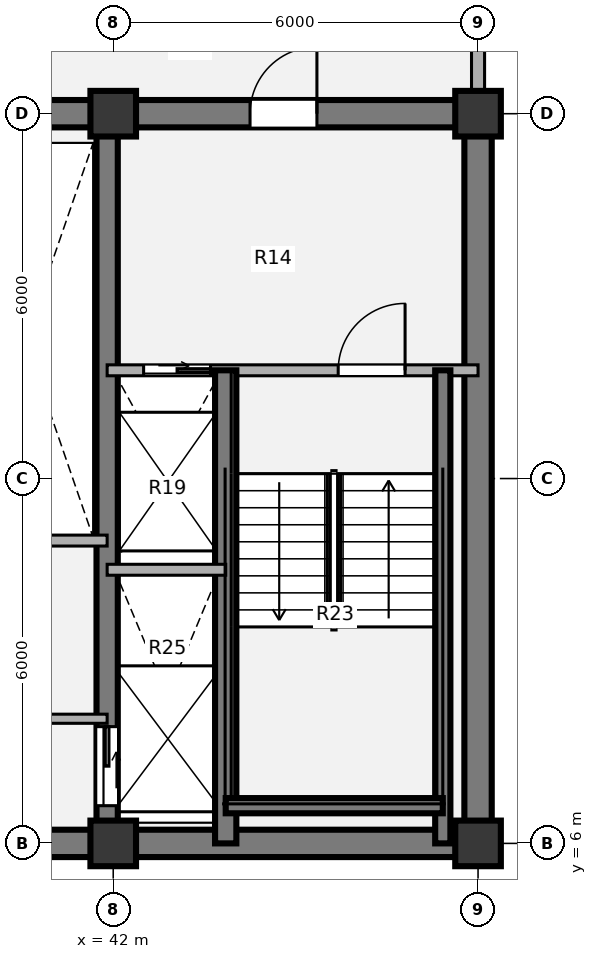
"""IFC4 building model, lengths in metres.
Left out: names, types, materials, properties, quantities, classifications, styles, units other than length and angle.
Written with IfcOpenShell. Run it as: python <this file> out.ifc"""

import sys

from ifc_helpers import new_model, si_unit, direction, frame, frame_2d, origin, origin_2d, place, context, subcontext, project, spatial, rectangle, extrude, source, transform, mapped, element, fill, save


model = new_model("IFC4")
c1 = context("Model", 3, precision=1e-05, world=origin(), true_north=direction((0.0, 1.0)))
c2 = subcontext(c1, "Body", "Model", "MODEL_VIEW")
j1 = project(units=[si_unit("LENGTHUNIT", "METRE"), si_unit("PLANEANGLEUNIT", "RADIAN")], contexts=[c1])
p1 = place(None, origin())
s1 = spatial("IfcSite", under=j1, at=p1, CompositionType="ELEMENT")
p2 = place(p1, origin())
s2 = spatial("IfcBuilding", under=s1, at=p2, CompositionType="ELEMENT")
p3 = place(p2, frame((0.0, 0.0, 186.66)))
s3 = spatial("IfcBuildingStorey", under=s2, at=p3, CompositionType="ELEMENT", Elevation=186.66)
m1 = source(origin(), c2, "Body", "SweptSolid", [
    extrude(rectangle(XDim=0.75, YDim=0.75, at=origin_2d()), origin(), (0.0, 0.0, 1.0), 3.78),
])
for number, where, z_axis, x_axis in (
    (1, (42.0, 6.0, 0.0), (0.0, 0.0, 1.0), (1.0, 0.0, 0.0)),
    (2, (48.0, 6.0, 0.0), (0.0, 0.0, 1.0), (1.0, 0.0, 0.0)),
    (3, (42.0, 18.0, 0.0), (0.0, 0.0, 1.0), (1.0, 0.0, 0.0)),
    (4, (48.0, 18.0, 0.0), (0.0, 0.0, 1.0), (1.0, 0.0, 0.0)),
):
    element("IfcColumn", number, at=place(p3, frame(where, z_axis=z_axis, x_axis=x_axis)), inside=s3, PredefinedType="COLUMN", context=c2, shape_type="MappedRepresentation", body=[
        mapped(m1, transform((0.0, 0.0, 0.0), x_axis=(1.0, 0.0, 0.0), y_axis=(0.0, 1.0, 0.0), z_axis=(0.0, 0.0, 1.0), scale=1.0)),
    ])
p4 = place(p3, frame((48.225, 6.0, 0.0), z_axis=(0.0, 0.0, 1.0), x_axis=(-1.0, 0.0, 0.0)))
e5 = element("IfcWall", 5, at=p4, inside=s3, PredefinedType="SHEAR", context=c2, shape_type="SweptSolid", body=[
    extrude(rectangle(XDim=24.45, YDim=0.45, at=frame_2d((12.225, 0.0))), origin(), (0.0, 0.0, 1.0), 3.78),
])
p5 = place(p3, frame((48.0, 18.0, 0.0), z_axis=(0.0, 0.0, 1.0), x_axis=(0.0, -1.0, 0.0)))
e6 = element("IfcWall", 6, at=p5, inside=s3, PredefinedType="SHEAR", context=c2, shape_type="SweptSolid", body=[
    extrude(rectangle(XDim=12.0, YDim=0.45, at=frame_2d((6.0, 0.0))), origin(), (0.0, 0.0, 1.0), 3.78),
])
p6 = place(p3, frame((38.8, 18.0, 0.0), z_axis=(0.0, 0.0, 1.0), x_axis=(1.0, 0.0, 0.0)))
e7 = element("IfcWall", 7, at=p6, inside=s3, PredefinedType="SHEAR", context=c2, shape_type="SweptSolid", body=[
    extrude(rectangle(XDim=9.425, YDim=0.45, at=frame_2d((4.712, 0.0))), origin(), (0.0, 0.0, 1.0), 3.78),
])
p7 = place(p6, frame((5.45, 0.0, 0.0)))
e8 = element("IfcOpeningElement", 8, at=p7, cuts=e7, PredefinedType="OPENING", context=c2, shape_type="SweptSolid", body=[
    extrude(rectangle(XDim=1.1, YDim=2.1, at=origin_2d()), frame((0.55, 0.235, 1.05), z_axis=(0.0, -1.0, 0.0), x_axis=(1.0, 0.0, 0.0)), (0.0, 0.0, 1.0), 0.47),
])
p8 = place(p3, frame((41.9, 18.0, 0.0), z_axis=(0.0, 0.0, 1.0), x_axis=(0.0, -1.0, 0.0)))
e9 = element("IfcWall", 9, at=p8, inside=s3, PredefinedType="SHEAR", context=c2, shape_type="SweptSolid", body=[
    extrude(rectangle(XDim=12.0, YDim=0.35, at=frame_2d((6.0, 0.0))), origin(), (0.0, 0.0, 1.0), 3.78),
])
p9 = place(p8, frame((10.08, 0.0, 0.0)))
e10 = element("IfcOpeningElement", 10, at=p9, cuts=e9, PredefinedType="OPENING", context=c2, shape_type="SweptSolid", body=[
    extrude(rectangle(XDim=1.3, YDim=2.1, at=origin_2d()), frame((0.65, 0.185, 1.05), z_axis=(0.0, -1.0, 0.0), x_axis=(1.0, 0.0, 0.0)), (0.0, 0.0, 1.0), 0.37),
])
p10 = place(p3, frame((48.0, 21.05, 0.0), z_axis=(0.0, 0.0, 1.0), x_axis=(0.0, -1.0, 0.0)))
e11 = element("IfcWall", 11, at=p10, inside=s3, PredefinedType="SOLIDWALL", context=c2, shape_type="SweptSolid", body=[
    extrude(rectangle(XDim=2.695, YDim=0.215, at=frame_2d((1.348, 0.0))), origin(), (0.0, 0.0, 1.0), 2.718),
])
p11 = place(p3, frame((38.0, 8.05, 0.0), z_axis=(0.0, 0.0, 1.0), x_axis=(1.0, 0.0, 0.0)))
e12 = element("IfcWall", 12, at=p11, inside=s3, PredefinedType="PARTITIONING", context=c2, shape_type="SweptSolid", body=[
    extrude(rectangle(XDim=3.9, YDim=0.15, at=frame_2d((1.95, 0.0))), origin(), (0.0, 0.0, 1.0), 3.5),
])
p12 = place(p11, frame((1.45, 0.0, 0.0)))
e13 = element("IfcOpeningElement", 13, at=p12, cuts=e12, PredefinedType="OPENING", context=c2, shape_type="SweptSolid", body=[
    extrude(rectangle(XDim=0.86, YDim=2.1, at=origin_2d()), frame((0.43, 0.085, 1.05), z_axis=(0.0, -1.0, 0.0), x_axis=(1.0, 0.0, 0.0)), (0.0, 0.0, 1.0), 0.17),
])
p13 = place(p3, frame((38.0, 10.98, 0.0), z_axis=(0.0, 0.0, 1.0), x_axis=(1.0, 0.0, 0.0)))
e14 = element("IfcWall", 14, at=p13, inside=s3, PredefinedType="PARTITIONING", context=c2, shape_type="SweptSolid", body=[
    extrude(rectangle(XDim=3.9, YDim=0.18, at=frame_2d((1.95, 0.0))), origin(), (0.0, 0.0, 1.0), 3.5),
])
p14 = place(p3, frame((41.9, 13.78, 0.0), z_axis=(0.0, 0.0, 1.0), x_axis=(1.0, 0.0, 0.0)))
e15 = element("IfcWall", 15, at=p14, inside=s3, PredefinedType="PARTITIONING", context=c2, shape_type="SweptSolid", body=[
    extrude(rectangle(XDim=6.1, YDim=0.18, at=frame_2d((3.05, 0.0))), origin(), (0.0, 0.0, 1.0), 3.5),
])
p15 = place(p14, frame((0.6, 0.0, 0.0)))
e16 = element("IfcOpeningElement", 16, at=p15, cuts=e15, PredefinedType="OPENING", context=c2, shape_type="SweptSolid", body=[
    extrude(rectangle(XDim=1.1, YDim=2.1, at=origin_2d()), frame((0.55, 0.1, 1.05), z_axis=(0.0, -1.0, 0.0), x_axis=(1.0, 0.0, 0.0)), (0.0, 0.0, 1.0), 0.2),
])
p16 = place(p14, frame((3.8, 0.0, 0.0)))
e17 = element("IfcOpeningElement", 17, at=p16, cuts=e15, PredefinedType="OPENING", context=c2, shape_type="SweptSolid", body=[
    extrude(rectangle(XDim=1.1, YDim=2.1, at=origin_2d()), frame((0.55, 0.1, 1.05), z_axis=(0.0, -1.0, 0.0), x_axis=(1.0, 0.0, 0.0)), (0.0, 0.0, 1.0), 0.2),
])
p17 = place(p3, frame((43.85, 6.0, 0.0), z_axis=(0.0, 0.0, 1.0), x_axis=(0.0, 1.0, 0.0)))
e18 = element("IfcWall", 18, at=p17, inside=s3, PredefinedType="SHEAR", context=c2, shape_type="SweptSolid", body=[
    extrude(rectangle(XDim=7.78, YDim=0.35, at=frame_2d((3.89, 0.0))), origin(), (0.0, 0.0, 1.0), 3.85),
])
p18 = place(p3, frame((47.42, 6.0, 0.0), z_axis=(0.0, 0.0, 1.0), x_axis=(0.0, 1.0, 0.0)))
e19 = element("IfcWall", 19, at=p18, inside=s3, PredefinedType="SHEAR", context=c2, shape_type="SweptSolid", body=[
    extrude(rectangle(XDim=7.78, YDim=0.25, at=frame_2d((3.89, 0.0))), origin(), (0.0, 0.0, 1.0), 3.85),
])
p19 = place(p3, frame((43.85, 6.62, 0.0), z_axis=(0.0, 0.0, 1.0), x_axis=(1.0, 0.0, 0.0)))
e20 = element("IfcWall", 20, at=p19, inside=s3, PredefinedType="SHEAR", context=c2, shape_type="SweptSolid", body=[
    extrude(rectangle(XDim=3.57, YDim=0.25, at=frame_2d((1.785, 0.0))), origin(), (0.0, 0.0, 1.0), 3.85),
])
p20 = place(p3, frame((41.9, 10.5, 0.0), z_axis=(0.0, 0.0, 1.0), x_axis=(1.0, 0.0, 0.0)))
e21 = element("IfcWall", 21, at=p20, inside=s3, PredefinedType="PARTITIONING", context=c2, shape_type="SweptSolid", body=[
    extrude(rectangle(XDim=1.95, YDim=0.18, at=frame_2d((0.975, 0.0))), origin(), (0.0, 0.0, 1.0), 3.5),
])
m2 = source(origin(), c2, "Body", "SweptSolid", [
    extrude(rectangle(XDim=1.1, YDim=2.1, at=origin_2d()), frame((0.55, 0.025, 1.05), z_axis=(0.0, -1.0, 0.0), x_axis=(1.0, 0.0, 0.0)), (0.0, 0.0, 1.0), 0.05),
])
p21 = place(p15, origin())
e22 = element("IfcDoor", 22, at=p21, inside=s3, OperationType="SLIDING_TO_RIGHT", PredefinedType="DOOR", context=c2, shape_type="MappedRepresentation", body=[
    mapped(m2, transform((0.0, 0.0, 0.0), x_axis=(1.0, 0.0, 0.0), y_axis=(0.0, 1.0, 0.0), z_axis=(0.0, 0.0, 1.0), scale=1.0)),
])
fill(e16, e22)
m3 = source(origin(), c2, "Body", "SweptSolid", [
    extrude(rectangle(XDim=1.1, YDim=2.1, at=origin_2d()), frame((0.55, 0.025, 1.05), z_axis=(0.0, -1.0, 0.0), x_axis=(1.0, 0.0, 0.0)), (0.0, 0.0, 1.0), 0.05),
])
p22 = place(p16, origin())
e23 = element("IfcDoor", 23, at=p22, inside=s3, OperationType="SINGLE_SWING_RIGHT", PredefinedType="DOOR", context=c2, shape_type="MappedRepresentation", body=[
    mapped(m3, transform((0.0, 0.0, 0.0), x_axis=(1.0, 0.0, 0.0), y_axis=(0.0, 1.0, 0.0), z_axis=(0.0, 0.0, 1.0), scale=1.0)),
])
fill(e17, e23)
m4 = source(origin(), c2, "Body", "SweptSolid", [
    extrude(rectangle(XDim=1.3, YDim=2.1, at=origin_2d()), frame((0.65, 0.025, 1.05), z_axis=(0.0, -1.0, 0.0), x_axis=(1.0, 0.0, 0.0)), (0.0, 0.0, 1.0), 0.05),
])
p23 = place(p9, origin())
e24 = element("IfcDoor", 24, at=p23, inside=s3, OperationType="SLIDING_TO_LEFT", PredefinedType="DOOR", context=c2, shape_type="MappedRepresentation", body=[
    mapped(m4, transform((0.0, 0.0, 0.0), x_axis=(1.0, 0.0, 0.0), y_axis=(0.0, 1.0, 0.0), z_axis=(0.0, 0.0, 1.0), scale=1.0)),
])
fill(e10, e24)
m5 = source(origin(), c2, "Body", "SweptSolid", [
    extrude(rectangle(XDim=1.1, YDim=2.1, at=origin_2d()), frame((0.55, 0.025, 1.05), z_axis=(0.0, -1.0, 0.0), x_axis=(1.0, 0.0, 0.0)), (0.0, 0.0, 1.0), 0.05),
])
p24 = place(p7, origin())
e25 = element("IfcDoor", 25, at=p24, inside=s3, OperationType="SINGLE_SWING_RIGHT", PredefinedType="DOOR", context=c2, shape_type="MappedRepresentation", body=[
    mapped(m5, transform((0.0, 0.0, 0.0), x_axis=(1.0, 0.0, 0.0), y_axis=(0.0, 1.0, 0.0), z_axis=(0.0, 0.0, 1.0), scale=1.0)),
])
fill(e8, e25)
save(model, sys.argv[1])
